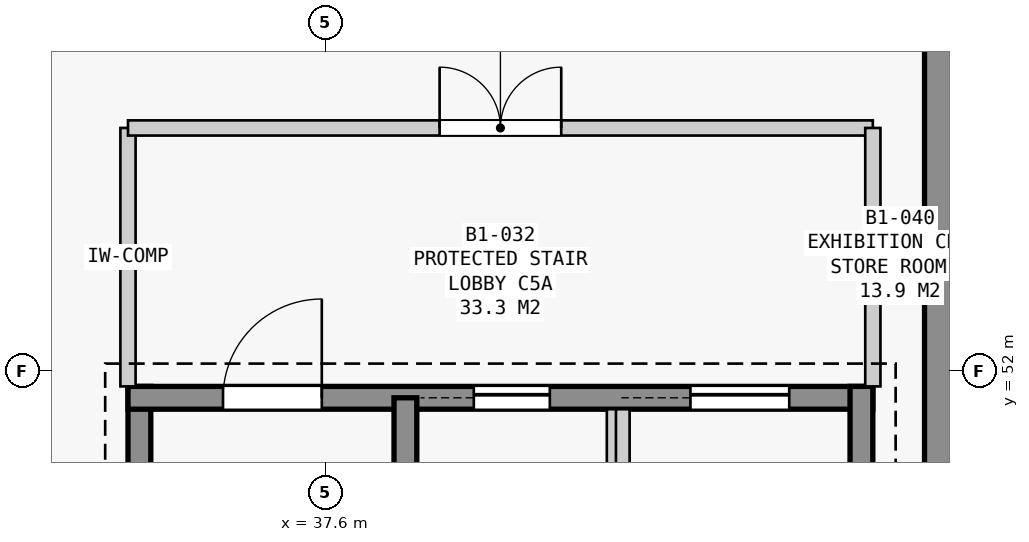
"""IFC4 building model, lengths in metres.
Left out: names, types, materials, properties, quantities, classifications, styles, units other than length and angle.
Written with IfcOpenShell. Run it as: python <this file> out.ifc"""

import sys

from ifc_helpers import new_model, si_unit, direction, frame, frame_2d, origin, place, context, subcontext, project, spatial, rectangle, extrude, element, fill, save


model = new_model("IFC4")
c1 = context("Model", 3, precision=1e-05, world=origin(), true_north=direction((0.0, 1.0)))
c2 = subcontext(c1, "Body", "Model", "MODEL_VIEW")
j1 = project(units=[si_unit("LENGTHUNIT", "METRE"), si_unit("PLANEANGLEUNIT", "RADIAN")], contexts=[c1])
p1 = place(None, origin())
s1 = spatial("IfcSite", under=j1, at=p1, CompositionType="ELEMENT")
p2 = place(p1, origin())
s2 = spatial("IfcBuilding", under=s1, at=p2, CompositionType="ELEMENT")
p3 = place(p2, frame((0.0, 0.0, -4.5)))
s3 = spatial("IfcBuildingStorey", under=s2, at=p3, CompositionType="ELEMENT", Elevation=-4.5)
p4 = place(p3, frame((45.69, 75.69, 0.0), z_axis=(0.0, 0.0, 1.0), x_axis=(0.0, -1.0, 0.0)))
e1 = element("IfcWall", 1, at=p4, inside=s3, PredefinedType="SOLIDWALL", context=c2, shape_type="SweptSolid", body=[
    extrude(rectangle(XDim=32.98, YDim=0.42, at=frame_2d((16.49, 0.0))), origin(), (0.0, 0.0, 1.0), 4.5),
])
p5 = place(p3, frame((35.15, 43.7, 0.0), z_axis=(0.0, 0.0, 1.0), x_axis=(0.0, 1.0, 0.0)))
e2 = element("IfcWall", 2, at=p5, inside=s3, PredefinedType="SHEAR", context=c2, shape_type="SweptSolid", body=[
    extrude(rectangle(XDim=8.1, YDim=0.3, at=frame_2d((4.05, 0.0))), origin(), (0.0, 0.0, 1.0), 4.1),
])
p6 = place(p3, frame((35.0, 51.65, 0.0), z_axis=(0.0, 0.0, 1.0), x_axis=(1.0, 0.0, 0.0)))
e3 = element("IfcWall", 3, at=p6, inside=s3, PredefinedType="SHEAR", context=c2, shape_type="SweptSolid", body=[
    extrude(rectangle(XDim=9.8, YDim=0.3, at=frame_2d((4.9, 0.0))), origin(), (0.0, 0.0, 1.0), 4.1),
])
p7 = place(p6, frame((1.25, 0.0, 0.0)))
e4 = element("IfcOpeningElement", 4, at=p7, cuts=e3, PredefinedType="OPENING", context=c2, shape_type="SweptSolid", body=[
    extrude(rectangle(XDim=1.3, YDim=2.2, at=frame_2d((0.65, 1.1))), frame((0.0, 0.16, 0.0), z_axis=(0.0, -1.0, 0.0), x_axis=(1.0, 0.0, 0.0)), (0.0, 0.0, 1.0), 0.32),
])
p8 = place(p6, frame((4.55, 0.0, 0.0)))
e5 = element("IfcOpeningElement", 5, at=p8, cuts=e3, PredefinedType="OPENING", context=c2, shape_type="SweptSolid", body=[
    extrude(rectangle(XDim=1.0, YDim=2.15, at=frame_2d((0.5, 1.075))), frame((0.0, 0.16, 0.0), z_axis=(0.0, -1.0, 0.0), x_axis=(1.0, 0.0, 0.0)), (0.0, 0.0, 1.0), 0.32),
])
p9 = place(p6, frame((7.4, 0.0, 0.0)))
e6 = element("IfcOpeningElement", 6, at=p9, cuts=e3, PredefinedType="OPENING", context=c2, shape_type="SweptSolid", body=[
    extrude(rectangle(XDim=1.3, YDim=2.2, at=frame_2d((0.65, 1.1))), frame((0.0, 0.16, 0.0), z_axis=(0.0, -1.0, 0.0), x_axis=(1.0, 0.0, 0.0)), (0.0, 0.0, 1.0), 0.32),
])
p10 = place(p3, frame((44.65, 51.8, 0.0), z_axis=(0.0, 0.0, 1.0), x_axis=(0.0, -1.0, 0.0)))
e7 = element("IfcWall", 7, at=p10, inside=s3, PredefinedType="SHEAR", context=c2, shape_type="SweptSolid", body=[
    extrude(rectangle(XDim=8.1, YDim=0.3, at=frame_2d((4.05, 0.0))), origin(), (0.0, 0.0, 1.0), 4.1),
])
p11 = place(p3, frame((38.65, 43.85, 0.0), z_axis=(0.0, 0.0, 1.0), x_axis=(0.0, 1.0, 0.0)))
e8 = element("IfcWall", 8, at=p11, inside=s3, PredefinedType="SHEAR", context=c2, shape_type="SweptSolid", body=[
    extrude(rectangle(XDim=7.8, YDim=0.3, at=frame_2d((3.9, 0.0))), origin(), (0.0, 0.0, 1.0), 4.1),
])
p12 = place(p3, frame((41.39, 48.7, 0.0), z_axis=(0.0, 0.0, 1.0), x_axis=(0.0, 1.0, 0.0)))
e9 = element("IfcWall", 9, at=p12, inside=s3, PredefinedType="PARTITIONING", context=c2, shape_type="SweptSolid", body=[
    extrude(rectangle(XDim=2.8, YDim=0.18, at=frame_2d((1.4, 0.0))), origin(), (0.0, 0.0, 1.0), 4.1),
])
p13 = place(p3, frame((41.51, 48.2, 0.0), z_axis=(0.0, 0.0, 1.0), x_axis=(0.0, 1.0, 0.0)))
e10 = element("IfcWall", 10, at=p13, inside=s3, PredefinedType="PARTITIONING", context=c2, shape_type="SweptSolid", body=[
    extrude(rectangle(XDim=3.3, YDim=0.18, at=frame_2d((1.65, 0.0))), origin(), (0.0, 0.0, 1.0), 4.1),
])
p14 = place(p3, frame((35.0, 51.8, 0.0), z_axis=(0.0, 0.0, 1.0), x_axis=(0.0, 1.0, 0.0)))
e11 = element("IfcWall", 11, at=p14, inside=s3, PredefinedType="STANDARD", context=c2, shape_type="SweptSolid", body=[
    extrude(rectangle(XDim=3.4, YDim=0.2, at=frame_2d((1.7, 0.0))), origin(), (0.0, 0.0, 1.0), 4.1),
])
p15 = place(p3, frame((35.0, 55.2, 0.0), z_axis=(0.0, 0.0, 1.0), x_axis=(1.0, 0.0, 0.0)))
e12 = element("IfcWall", 12, at=p15, inside=s3, PredefinedType="STANDARD", context=c2, shape_type="SweptSolid", body=[
    extrude(rectangle(XDim=9.8, YDim=0.2, at=frame_2d((4.9, 0.0))), origin(), (0.0, 0.0, 1.0), 4.1),
])
p16 = place(p15, frame((4.1, 0.0, 0.0)))
e13 = element("IfcOpeningElement", 13, at=p16, cuts=e12, PredefinedType="OPENING", context=c2, shape_type="SweptSolid", body=[
    extrude(rectangle(XDim=1.6, YDim=2.2, at=frame_2d((0.8, 1.1))), frame((0.0, 0.11, 0.0), z_axis=(0.0, -1.0, 0.0), x_axis=(1.0, 0.0, 0.0)), (0.0, 0.0, 1.0), 0.22),
])
p17 = place(p3, frame((44.8, 55.2, 0.0), z_axis=(0.0, 0.0, 1.0), x_axis=(0.0, -1.0, 0.0)))
e14 = element("IfcWall", 14, at=p17, inside=s3, PredefinedType="STANDARD", context=c2, shape_type="SweptSolid", body=[
    extrude(rectangle(XDim=3.4, YDim=0.2, at=frame_2d((1.7, 0.0))), origin(), (0.0, 0.0, 1.0), 4.1),
])
p18 = place(p7, origin())
e15 = element("IfcDoor", 15, at=p18, inside=s3, OperationType="SINGLE_SWING_RIGHT", PredefinedType="DOOR", context=c2, shape_type="SweptSolid", body=[
    extrude(rectangle(XDim=1.3, YDim=2.2, at=frame_2d((0.65, 1.1))), frame((0.0, 0.025, 0.0), z_axis=(0.0, -1.0, 0.0), x_axis=(1.0, 0.0, 0.0)), (0.0, 0.0, 1.0), 0.05),
])
fill(e4, e15)
p19 = place(p8, origin())
e16 = element("IfcDoor", 16, at=p19, inside=s3, OperationType="SLIDING_TO_LEFT", PredefinedType="DOOR", context=c2, shape_type="SweptSolid", body=[
    extrude(rectangle(XDim=1.0, YDim=2.15, at=frame_2d((0.5, 1.075))), frame((0.0, 0.025, 0.0), z_axis=(0.0, -1.0, 0.0), x_axis=(1.0, 0.0, 0.0)), (0.0, 0.0, 1.0), 0.05),
])
fill(e5, e16)
p20 = place(p9, origin())
e17 = element("IfcDoor", 17, at=p20, inside=s3, OperationType="SLIDING_TO_LEFT", PredefinedType="DOOR", context=c2, shape_type="SweptSolid", body=[
    extrude(rectangle(XDim=1.3, YDim=2.2, at=frame_2d((0.65, 1.1))), frame((0.0, 0.025, 0.0), z_axis=(0.0, -1.0, 0.0), x_axis=(1.0, 0.0, 0.0)), (0.0, 0.0, 1.0), 0.05),
])
fill(e6, e17)
p21 = place(p16, origin())
e18 = element("IfcDoor", 18, at=p21, inside=s3, OperationType="DOUBLE_DOOR_SINGLE_SWING", PredefinedType="DOOR", context=c2, shape_type="SweptSolid", body=[
    extrude(rectangle(XDim=1.6, YDim=2.2, at=frame_2d((0.8, 1.1))), frame((0.0, 0.025, 0.0), z_axis=(0.0, -1.0, 0.0), x_axis=(1.0, 0.0, 0.0)), (0.0, 0.0, 1.0), 0.05),
])
fill(e13, e18)
save(model, sys.argv[1])
